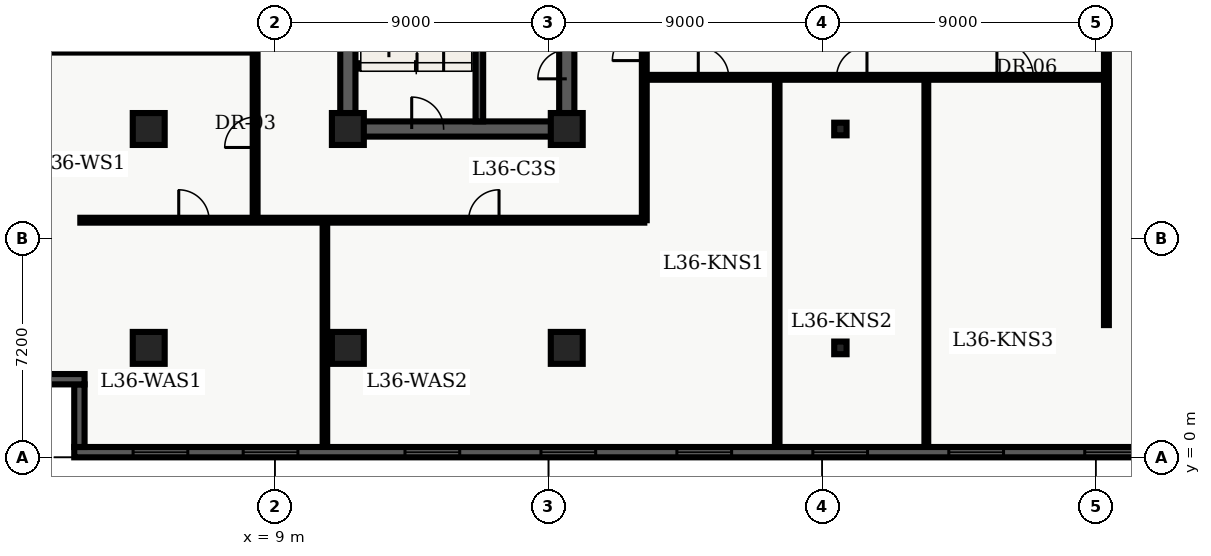
"""IFC4 building model, lengths in metres.
Left out: names, types, materials, properties, quantities, classifications, styles, units other than length and angle.
Written with IfcOpenShell. Run it as: python <this file> out.ifc"""

import sys

from ifc_helpers import new_model, entity, si_unit, converted_unit, direction, frame, origin_with_axes, origin_2d_with_axis, place, context, subcontext, project, spatial, polyline, rectangle, i_section, outline, extrude, element, fill, save


model = new_model("IFC4")
c1 = context("Model", 3, precision=1e-05, world=origin_with_axes(), true_north=direction((0.0, 1.0)))
c2 = subcontext(c1, "Body", "Model", "MODEL_VIEW")
j1 = project(units=[si_unit("LENGTHUNIT", "METRE"), converted_unit("PLANEANGLEUNIT", "DEGREE", entity("IfcPlaneAngleMeasure", 0.017), si_unit("PLANEANGLEUNIT", "RADIAN"), dimensions=[0, 0, 0, 0, 0, 0, 0])], contexts=[c1])
p1 = place(None, origin_with_axes())
s1 = spatial("IfcSite", under=j1, at=p1, CompositionType="ELEMENT")
p2 = place(p1, origin_with_axes())
s2 = spatial("IfcBuilding", under=s1, at=p2, CompositionType="ELEMENT")
p3 = place(p2, frame((0.0, 0.0, 148.5), z_axis=(0.0, 0.0, 1.0), x_axis=(1.0, 0.0, 0.0)))
s3 = spatial("IfcBuildingStorey", under=s2, at=p3, CompositionType="ELEMENT", Elevation=148.5)
p4 = place(p3, frame((11.4, 10.8, 0.0), z_axis=(0.0, 0.0, 1.0), x_axis=(0.0, 1.0, 0.0)))
e1 = element("IfcWall", 1, at=p4, inside=s3, PredefinedType="SHEAR", context=c2, shape_type="SweptSolid", body=[
    extrude(outline(polyline([(0.0, -0.25), (27.0, -0.25), (27.0, 0.25), (0.0, 0.25), (0.0, -0.25)])), origin_with_axes(), (0.0, 0.0, 1.0), 3.66),
])
p5 = place(p3, frame((11.4, 10.8, 0.0), z_axis=(0.0, 0.0, 1.0), x_axis=(1.0, 0.0, 0.0)))
e2 = element("IfcWall", 2, at=p5, inside=s3, PredefinedType="SHEAR", context=c2, shape_type="SweptSolid", body=[
    extrude(outline(polyline([(0.0, -0.25), (7.2, -0.25), (7.2, 0.25), (0.0, 0.25), (0.0, -0.25)])), origin_with_axes(), (0.0, 0.0, 1.0), 3.66),
])
p6 = place(p5, frame((2.625, 0.0, 0.0), z_axis=(0.0, 0.0, 1.0), x_axis=(1.0, 0.0, 0.0)))
e3 = element("IfcOpeningElement", 3, at=p6, cuts=e2, PredefinedType="OPENING", context=c2, shape_type="SweptSolid", body=[
    extrude(rectangle(XDim=1.05, YDim=0.52, at=origin_2d_with_axis()), origin_with_axes(), (0.0, 0.0, 1.0), 2.15),
])
p7 = place(p3, frame((18.6, 10.8, 0.0), z_axis=(0.0, 0.0, 1.0), x_axis=(0.0, 1.0, 0.0)))
e4 = element("IfcWall", 4, at=p7, inside=s3, PredefinedType="SHEAR", context=c2, shape_type="SweptSolid", body=[
    extrude(outline(polyline([(0.0, -0.25), (13.5, -0.25), (13.5, 0.25), (0.0, 0.25), (0.0, -0.25)])), origin_with_axes(), (0.0, 0.0, 1.0), 3.66),
])
p8 = place(p7, frame((11.125, 0.0, 0.0), z_axis=(0.0, 0.0, 1.0), x_axis=(1.0, 0.0, 0.0)))
e5 = element("IfcOpeningElement", 5, at=p8, cuts=e4, PredefinedType="OPENING", context=c2, shape_type="SweptSolid", body=[
    extrude(rectangle(XDim=1.05, YDim=0.52, at=origin_2d_with_axis()), origin_with_axes(), (0.0, 0.0, 1.0), 2.15),
])
p9 = place(p7, frame((2.125, 0.0, 0.0), z_axis=(0.0, 0.0, 1.0), x_axis=(1.0, 0.0, 0.0)))
e6 = element("IfcOpeningElement", 6, at=p9, cuts=e4, PredefinedType="OPENING", context=c2, shape_type="SweptSolid", body=[
    extrude(rectangle(XDim=0.95, YDim=0.52, at=origin_2d_with_axis()), origin_with_axes(), (0.0, 0.0, 1.0), 2.15),
])
p10 = place(p7, frame((6.275, 0.0, 0.0), z_axis=(0.0, 0.0, 1.0), x_axis=(1.0, 0.0, 0.0)))
e7 = element("IfcOpeningElement", 7, at=p10, cuts=e4, PredefinedType="OPENING", context=c2, shape_type="SweptSolid", body=[
    extrude(rectangle(XDim=0.95, YDim=0.52, at=origin_2d_with_axis()), origin_with_axes(), (0.0, 0.0, 1.0), 2.15),
])
p11 = place(p3, frame((15.725, 11.05, 0.0), z_axis=(0.0, 0.0, 1.0), x_axis=(0.0, 1.0, 0.0)))
e8 = element("IfcWall", 8, at=p11, inside=s3, PredefinedType="SHEAR", context=c2, shape_type="SweptSolid", body=[
    extrude(outline(polyline([(0.0, -0.125), (8.65, -0.125), (8.65, 0.125), (0.0, 0.125), (0.0, -0.125)])), origin_with_axes(), (0.0, 0.0, 1.0), 3.66),
])
for number, where, z_axis, x_axis in (
    (9, (11.4, 3.6, 0.0), (0.0, 0.0, 1.0), (1.0, 0.0, 0.0)),
    (10, (11.4, 10.8, 0.0), (0.0, 0.0, 1.0), (1.0, 0.0, 0.0)),
    (11, (18.6, 3.6, 0.0), (0.0, 0.0, 1.0), (1.0, 0.0, 0.0)),
    (12, (18.6, 10.8, 0.0), (0.0, 0.0, 1.0), (1.0, 0.0, 0.0)),
    (13, (4.85, 3.6, 0.0), (0.0, 0.0, 1.0), (1.0, 0.0, 0.0)),
    (14, (4.85, 10.8, 0.0), (0.0, 0.0, 1.0), (1.0, 0.0, 0.0)),
):
    element("IfcColumn", number, at=place(p3, frame(where, z_axis=z_axis, x_axis=x_axis)), inside=s3, PredefinedType="COLUMN", context=c2, shape_type="SweptSolid", body=[
        extrude(rectangle(XDim=1.05, YDim=1.05, at=origin_2d_with_axis()), origin_with_axes(), (0.0, 0.0, 1.0), 3.9),
    ])
for number, where, z_axis, x_axis in (
    (15, (27.6, 3.6, 0.0), (0.0, 0.0, 1.0), (1.0, 0.0, 0.0)),
    (16, (27.6, 10.8, 0.0), (0.0, 0.0, 1.0), (1.0, 0.0, 0.0)),
):
    element("IfcColumn", number, at=place(p3, frame(where, z_axis=z_axis, x_axis=x_axis)), inside=s3, PredefinedType="COLUMN", context=c2, shape_type="SweptSolid", body=[
        extrude(i_section(OverallWidth=0.406, OverallDepth=0.416, WebThickness=0.03, FlangeThickness=0.048, FilletRadius=0.022, at=origin_2d_with_axis()), origin_with_axes(), (0.0, 0.0, 1.0), 3.9),
    ])
p12 = place(p3, frame((2.6, 7.8, 0.0), z_axis=(0.0, 0.0, 1.0), x_axis=(1.0, 0.0, 0.0)))
e17 = element("IfcWall", 17, at=p12, inside=s3, PredefinedType="PARTITIONING", context=c2, shape_type="SweptSolid", body=[
    extrude(outline(polyline([(0.0, -0.08), (18.55, -0.08), (18.55, 0.08), (0.0, 0.08), (0.0, -0.08)])), origin_with_axes(), (0.0, 0.0, 1.0), 2.7),
])
p13 = place(p12, frame((3.737, 0.0, 0.0), z_axis=(0.0, 0.0, 1.0), x_axis=(1.0, 0.0, 0.0)))
e18 = element("IfcOpeningElement", 18, at=p13, cuts=e17, PredefinedType="OPENING", context=c2, shape_type="SweptSolid", body=[
    extrude(rectangle(XDim=1.0, YDim=0.18, at=origin_2d_with_axis()), origin_with_axes(), (0.0, 0.0, 1.0), 2.15),
])
p14 = place(p12, frame((13.273, 0.0, 0.0), z_axis=(0.0, 0.0, 1.0), x_axis=(1.0, 0.0, 0.0)))
e19 = element("IfcOpeningElement", 19, at=p14, cuts=e17, PredefinedType="OPENING", context=c2, shape_type="SweptSolid", body=[
    extrude(rectangle(XDim=1.0, YDim=0.18, at=origin_2d_with_axis()), origin_with_axes(), (0.0, 0.0, 1.0), 2.15),
])
p15 = place(p3, frame((21.15, 7.8, 0.0), z_axis=(0.0, 0.0, 1.0), x_axis=(0.0, 1.0, 0.0)))
e20 = element("IfcWall", 20, at=p15, inside=s3, PredefinedType="PARTITIONING", context=c2, shape_type="SweptSolid", body=[
    extrude(outline(polyline([(0.0, -0.08), (32.7, -0.08), (32.7, 0.08), (0.0, 0.08), (0.0, -0.08)])), origin_with_axes(), (0.0, 0.0, 1.0), 2.7),
])
p16 = place(p15, frame((5.775, 0.0, 0.0), z_axis=(0.0, 0.0, 1.0), x_axis=(1.0, 0.0, 0.0)))
e21 = element("IfcOpeningElement", 21, at=p16, cuts=e20, PredefinedType="OPENING", context=c2, shape_type="SweptSolid", body=[
    extrude(rectangle(XDim=1.05, YDim=0.18, at=origin_2d_with_axis()), origin_with_axes(), (0.0, 0.0, 1.0), 2.15),
])
p17 = place(p3, frame((8.35, 7.8, 0.0), z_axis=(0.0, 0.0, 1.0), x_axis=(0.0, 1.0, 0.0)))
e22 = element("IfcWall", 22, at=p17, inside=s3, PredefinedType="PARTITIONING", context=c2, shape_type="SweptSolid", body=[
    extrude(outline(polyline([(0.0, -0.08), (12.6, -0.08), (12.6, 0.08), (0.0, 0.08), (0.0, -0.08)])), origin_with_axes(), (0.0, 0.0, 1.0), 2.7),
])
p18 = place(p17, frame((2.893, 0.0, 0.0), z_axis=(0.0, 0.0, 1.0), x_axis=(1.0, 0.0, 0.0)))
e23 = element("IfcOpeningElement", 23, at=p18, cuts=e22, PredefinedType="OPENING", context=c2, shape_type="SweptSolid", body=[
    extrude(rectangle(XDim=1.0, YDim=0.18, at=origin_2d_with_axis()), origin_with_axes(), (0.0, 0.0, 1.0), 2.15),
])
p19 = place(p17, frame((9.088, 0.0, 0.0), z_axis=(0.0, 0.0, 1.0), x_axis=(1.0, 0.0, 0.0)))
e24 = element("IfcOpeningElement", 24, at=p19, cuts=e22, PredefinedType="OPENING", context=c2, shape_type="SweptSolid", body=[
    extrude(rectangle(XDim=1.0, YDim=0.18, at=origin_2d_with_axis()), origin_with_axes(), (0.0, 0.0, 1.0), 2.15),
])
p20 = place(p3, frame((0.335, 13.455, 0.0), z_axis=(0.0, 0.0, 1.0), x_axis=(1.0, 0.0, 0.0)))
e25 = element("IfcWall", 25, at=p20, inside=s3, PredefinedType="PARTITIONING", context=c2, shape_type="SweptSolid", body=[
    extrude(outline(polyline([(0.0, -0.14), (7.895, -0.14), (7.895, 0.14), (0.0, 0.14), (0.0, -0.14)])), origin_with_axes(), (0.0, 0.0, 1.0), 2.7),
])
p21 = place(p3, frame((10.645, 0.335, 0.0), z_axis=(0.0, 0.0, 1.0), x_axis=(0.0, 1.0, 0.0)))
e26 = element("IfcWall", 26, at=p21, inside=s3, PredefinedType="PARTITIONING", context=c2, shape_type="SweptSolid", body=[
    extrude(outline(polyline([(0.0, -0.075), (7.365, -0.075), (7.365, 0.075), (0.0, 0.075), (0.0, -0.075)])), origin_with_axes(), (0.0, 0.0, 1.0), 2.7),
])
p22 = place(p3, frame((21.15, 12.5, 0.0), z_axis=(0.0, 0.0, 1.0), x_axis=(1.0, 0.0, 0.0)))
e27 = element("IfcWall", 27, at=p22, inside=s3, PredefinedType="PARTITIONING", context=c2, shape_type="SweptSolid", body=[
    extrude(outline(polyline([(0.0, -0.08), (15.2, -0.08), (15.2, 0.08), (0.0, 0.08), (0.0, -0.08)])), origin_with_axes(), (0.0, 0.0, 1.0), 2.7),
])
p23 = place(p22, frame((2.276, 0.0, 0.0), z_axis=(0.0, 0.0, 1.0), x_axis=(1.0, 0.0, 0.0)))
e28 = element("IfcOpeningElement", 28, at=p23, cuts=e27, PredefinedType="OPENING", context=c2, shape_type="SweptSolid", body=[
    extrude(rectangle(XDim=1.0, YDim=0.18, at=origin_2d_with_axis()), origin_with_axes(), (0.0, 0.0, 1.0), 2.15),
])
p24 = place(p22, frame((6.824, 0.0, 0.0), z_axis=(0.0, 0.0, 1.0), x_axis=(1.0, 0.0, 0.0)))
e29 = element("IfcOpeningElement", 29, at=p24, cuts=e27, PredefinedType="OPENING", context=c2, shape_type="SweptSolid", body=[
    extrude(rectangle(XDim=1.0, YDim=0.18, at=origin_2d_with_axis()), origin_with_axes(), (0.0, 0.0, 1.0), 2.15),
])
p25 = place(p22, frame((12.198, 0.0, 0.0), z_axis=(0.0, 0.0, 1.0), x_axis=(1.0, 0.0, 0.0)))
e30 = element("IfcOpeningElement", 30, at=p25, cuts=e27, PredefinedType="OPENING", context=c2, shape_type="SweptSolid", body=[
    extrude(rectangle(XDim=1.2, YDim=0.18, at=origin_2d_with_axis()), origin_with_axes(), (0.0, 0.0, 1.0), 2.2),
])
p26 = place(p3, frame((36.35, 4.35, 0.0), z_axis=(0.0, 0.0, 1.0), x_axis=(0.0, 1.0, 0.0)))
e31 = element("IfcWall", 31, at=p26, inside=s3, PredefinedType="PARTITIONING", context=c2, shape_type="SweptSolid", body=[
    extrude(outline(polyline([(0.0, -0.08), (16.95, -0.08), (16.95, 0.08), (0.0, 0.08), (0.0, -0.08)])), origin_with_axes(), (0.0, 0.0, 1.0), 2.7),
])
p27 = place(p3, frame((25.522, 0.335, 0.0), z_axis=(0.0, 0.0, 1.0), x_axis=(0.0, 1.0, 0.0)))
e32 = element("IfcWall", 32, at=p27, inside=s3, PredefinedType="PARTITIONING", context=c2, shape_type="SweptSolid", body=[
    extrude(outline(polyline([(0.0, -0.075), (12.045, -0.075), (12.045, 0.075), (0.0, 0.075), (0.0, -0.075)])), origin_with_axes(), (0.0, 0.0, 1.0), 2.7),
])
p28 = place(p3, frame((30.427, 0.335, 0.0), z_axis=(0.0, 0.0, 1.0), x_axis=(0.0, 1.0, 0.0)))
e33 = element("IfcWall", 33, at=p28, inside=s3, PredefinedType="PARTITIONING", context=c2, shape_type="SweptSolid", body=[
    extrude(outline(polyline([(0.0, -0.062), (12.045, -0.062), (12.045, 0.062), (0.0, 0.062), (0.0, -0.062)])), origin_with_axes(), (0.0, 0.0, 1.0), 2.7),
])
p29 = place(p3, frame((57.26, 0.17, 0.0), z_axis=(0.0, 0.0, 1.0), x_axis=(-1.0, 0.0, 0.0)))
e34 = element("IfcWall", 34, at=p29, inside=s3, PredefinedType="SOLIDWALL", context=c2, shape_type="SweptSolid", body=[
    extrude(outline(polyline([(0.0, -0.17), (54.86, -0.17), (54.86, 0.17), (0.0, 0.17), (0.0, -0.17)])), origin_with_axes(), (0.0, 0.0, 1.0), 3.66),
])
p30 = place(p29, frame((2.836, 0.0, 0.45), z_axis=(0.0, 0.0, 1.0), x_axis=(1.0, 0.0, 0.0)))
e35 = element("IfcOpeningElement", 35, at=p30, cuts=e34, PredefinedType="OPENING", context=c2, shape_type="SweptSolid", body=[
    extrude(rectangle(XDim=1.8, YDim=0.36, at=origin_2d_with_axis()), origin_with_axes(), (0.0, 0.0, 1.0), 2.1),
])
p31 = place(p29, frame((7.307, 0.0, 0.45), z_axis=(0.0, 0.0, 1.0), x_axis=(1.0, 0.0, 0.0)))
e36 = element("IfcOpeningElement", 36, at=p31, cuts=e34, PredefinedType="OPENING", context=c2, shape_type="SweptSolid", body=[
    extrude(rectangle(XDim=1.8, YDim=0.36, at=origin_2d_with_axis()), origin_with_axes(), (0.0, 0.0, 1.0), 2.1),
])
p32 = place(p29, frame((11.779, 0.0, 0.45), z_axis=(0.0, 0.0, 1.0), x_axis=(1.0, 0.0, 0.0)))
e37 = element("IfcOpeningElement", 37, at=p32, cuts=e34, PredefinedType="OPENING", context=c2, shape_type="SweptSolid", body=[
    extrude(rectangle(XDim=1.8, YDim=0.36, at=origin_2d_with_axis()), origin_with_axes(), (0.0, 0.0, 1.0), 2.1),
])
p33 = place(p29, frame((16.251, 0.0, 0.45), z_axis=(0.0, 0.0, 1.0), x_axis=(1.0, 0.0, 0.0)))
e38 = element("IfcOpeningElement", 38, at=p33, cuts=e34, PredefinedType="OPENING", context=c2, shape_type="SweptSolid", body=[
    extrude(rectangle(XDim=1.8, YDim=0.36, at=origin_2d_with_axis()), origin_with_axes(), (0.0, 0.0, 1.0), 2.1),
])
p34 = place(p29, frame((20.723, 0.0, 0.45), z_axis=(0.0, 0.0, 1.0), x_axis=(1.0, 0.0, 0.0)))
e39 = element("IfcOpeningElement", 39, at=p34, cuts=e34, PredefinedType="OPENING", context=c2, shape_type="SweptSolid", body=[
    extrude(rectangle(XDim=1.8, YDim=0.36, at=origin_2d_with_axis()), origin_with_axes(), (0.0, 0.0, 1.0), 2.1),
])
p35 = place(p29, frame((25.194, 0.0, 0.45), z_axis=(0.0, 0.0, 1.0), x_axis=(1.0, 0.0, 0.0)))
e40 = element("IfcOpeningElement", 40, at=p35, cuts=e34, PredefinedType="OPENING", context=c2, shape_type="SweptSolid", body=[
    extrude(rectangle(XDim=1.8, YDim=0.36, at=origin_2d_with_axis()), origin_with_axes(), (0.0, 0.0, 1.0), 2.1),
])
p36 = place(p29, frame((29.666, 0.0, 0.45), z_axis=(0.0, 0.0, 1.0), x_axis=(1.0, 0.0, 0.0)))
e41 = element("IfcOpeningElement", 41, at=p36, cuts=e34, PredefinedType="OPENING", context=c2, shape_type="SweptSolid", body=[
    extrude(rectangle(XDim=1.8, YDim=0.36, at=origin_2d_with_axis()), origin_with_axes(), (0.0, 0.0, 1.0), 2.1),
])
p37 = place(p29, frame((34.138, 0.0, 0.45), z_axis=(0.0, 0.0, 1.0), x_axis=(1.0, 0.0, 0.0)))
e42 = element("IfcOpeningElement", 42, at=p37, cuts=e34, PredefinedType="OPENING", context=c2, shape_type="SweptSolid", body=[
    extrude(rectangle(XDim=1.8, YDim=0.36, at=origin_2d_with_axis()), origin_with_axes(), (0.0, 0.0, 1.0), 2.1),
])
p38 = place(p29, frame((38.609, 0.0, 0.45), z_axis=(0.0, 0.0, 1.0), x_axis=(1.0, 0.0, 0.0)))
e43 = element("IfcOpeningElement", 43, at=p38, cuts=e34, PredefinedType="OPENING", context=c2, shape_type="SweptSolid", body=[
    extrude(rectangle(XDim=1.8, YDim=0.36, at=origin_2d_with_axis()), origin_with_axes(), (0.0, 0.0, 1.0), 2.1),
])
p39 = place(p29, frame((43.081, 0.0, 0.45), z_axis=(0.0, 0.0, 1.0), x_axis=(1.0, 0.0, 0.0)))
e44 = element("IfcOpeningElement", 44, at=p39, cuts=e34, PredefinedType="OPENING", context=c2, shape_type="SweptSolid", body=[
    extrude(rectangle(XDim=1.8, YDim=0.36, at=origin_2d_with_axis()), origin_with_axes(), (0.0, 0.0, 1.0), 2.1),
])
p40 = place(p29, frame((48.403, 0.0, 0.45), z_axis=(0.0, 0.0, 1.0), x_axis=(1.0, 0.0, 0.0)))
e45 = element("IfcOpeningElement", 45, at=p40, cuts=e34, PredefinedType="OPENING", context=c2, shape_type="SweptSolid", body=[
    extrude(rectangle(XDim=1.8, YDim=0.36, at=origin_2d_with_axis()), origin_with_axes(), (0.0, 0.0, 1.0), 2.1),
])
p41 = place(p29, frame((52.024, 0.0, 0.45), z_axis=(0.0, 0.0, 1.0), x_axis=(1.0, 0.0, 0.0)))
e46 = element("IfcOpeningElement", 46, at=p41, cuts=e34, PredefinedType="OPENING", context=c2, shape_type="SweptSolid", body=[
    extrude(rectangle(XDim=1.8, YDim=0.36, at=origin_2d_with_axis()), origin_with_axes(), (0.0, 0.0, 1.0), 2.1),
])
p42 = place(p3, frame((2.57, 0.34, 0.0), z_axis=(0.0, 0.0, 1.0), x_axis=(0.0, 1.0, 0.0)))
e47 = element("IfcWall", 47, at=p42, inside=s3, PredefinedType="SOLIDWALL", context=c2, shape_type="SweptSolid", body=[
    extrude(outline(polyline([(0.0, -0.17), (2.06, -0.17), (2.06, 0.17), (0.0, 0.17), (0.0, -0.17)])), origin_with_axes(), (0.0, 0.0, 1.0), 3.66),
])
p43 = place(p3, frame((2.74, 2.57, 0.0), z_axis=(0.0, 0.0, 1.0), x_axis=(-1.0, 0.0, 0.0)))
e48 = element("IfcWall", 48, at=p43, inside=s3, PredefinedType="SOLIDWALL", context=c2, shape_type="SweptSolid", body=[
    extrude(outline(polyline([(0.0, -0.17), (2.74, -0.17), (2.74, 0.17), (0.0, 0.17), (0.0, -0.17)])), origin_with_axes(), (0.0, 0.0, 1.0), 3.66),
])
p44 = place(p5, frame((2.625, 0.0, 0.0), z_axis=(0.0, 0.0, 1.0), x_axis=(1.0, 0.0, 0.0)))
e49 = element("IfcDoor", 49, at=p44, inside=s3, OperationType="SINGLE_SWING_LEFT", PredefinedType="DOOR", context=c2, shape_type="SweptSolid", body=[
    extrude(rectangle(XDim=1.05, YDim=0.09, at=origin_2d_with_axis()), origin_with_axes(), (0.0, 0.0, 1.0), 2.15),
])
fill(e3, e49)
p45 = place(p7, frame((2.125, 0.0, 0.0), z_axis=(0.0, 0.0, 1.0), x_axis=(1.0, 0.0, 0.0)))
e50 = element("IfcDoor", 50, at=p45, inside=s3, OperationType="SINGLE_SWING_LEFT", PredefinedType="DOOR", context=c2, shape_type="SweptSolid", body=[
    extrude(rectangle(XDim=0.95, YDim=0.09, at=origin_2d_with_axis()), origin_with_axes(), (0.0, 0.0, 1.0), 2.15),
])
fill(e6, e50)
p46 = place(p17, frame((2.893, 0.0, 0.0), z_axis=(0.0, 0.0, 1.0), x_axis=(1.0, 0.0, 0.0)))
e51 = element("IfcDoor", 51, at=p46, inside=s3, OperationType="SINGLE_SWING_LEFT", PredefinedType="DOOR", context=c2, shape_type="SweptSolid", body=[
    extrude(rectangle(XDim=1.0, YDim=0.09, at=origin_2d_with_axis()), origin_with_axes(), (0.0, 0.0, 1.0), 2.15),
])
fill(e23, e51)
p47 = place(p12, frame((3.737, 0.0, 0.0), z_axis=(0.0, 0.0, 1.0), x_axis=(1.0, 0.0, 0.0)))
e52 = element("IfcDoor", 52, at=p47, inside=s3, OperationType="SINGLE_SWING_LEFT", PredefinedType="DOOR", context=c2, shape_type="SweptSolid", body=[
    extrude(rectangle(XDim=1.0, YDim=0.09, at=origin_2d_with_axis()), origin_with_axes(), (0.0, 0.0, 1.0), 2.15),
])
fill(e18, e52)
p48 = place(p12, frame((13.273, 0.0, 0.0), z_axis=(0.0, 0.0, 1.0), x_axis=(1.0, 0.0, 0.0)))
e53 = element("IfcDoor", 53, at=p48, inside=s3, OperationType="SINGLE_SWING_RIGHT", PredefinedType="DOOR", context=c2, shape_type="SweptSolid", body=[
    extrude(rectangle(XDim=1.0, YDim=0.09, at=origin_2d_with_axis()), origin_with_axes(), (0.0, 0.0, 1.0), 2.15),
])
fill(e19, e53)
p49 = place(p15, frame((5.775, 0.0, 0.0), z_axis=(0.0, 0.0, 1.0), x_axis=(1.0, 0.0, 0.0)))
e54 = element("IfcDoor", 54, at=p49, inside=s3, OperationType="SINGLE_SWING_LEFT", PredefinedType="DOOR", context=c2, shape_type="SweptSolid", body=[
    extrude(rectangle(XDim=1.05, YDim=0.09, at=origin_2d_with_axis()), origin_with_axes(), (0.0, 0.0, 1.0), 2.15),
])
fill(e21, e54)
p50 = place(p22, frame((2.276, 0.0, 0.0), z_axis=(0.0, 0.0, 1.0), x_axis=(1.0, 0.0, 0.0)))
e55 = element("IfcDoor", 55, at=p50, inside=s3, OperationType="SINGLE_SWING_LEFT", PredefinedType="DOOR", context=c2, shape_type="SweptSolid", body=[
    extrude(rectangle(XDim=1.0, YDim=0.09, at=origin_2d_with_axis()), origin_with_axes(), (0.0, 0.0, 1.0), 2.15),
])
fill(e28, e55)
p51 = place(p22, frame((6.824, 0.0, 0.0), z_axis=(0.0, 0.0, 1.0), x_axis=(1.0, 0.0, 0.0)))
e56 = element("IfcDoor", 56, at=p51, inside=s3, OperationType="SINGLE_SWING_RIGHT", PredefinedType="DOOR", context=c2, shape_type="SweptSolid", body=[
    extrude(rectangle(XDim=1.0, YDim=0.09, at=origin_2d_with_axis()), origin_with_axes(), (0.0, 0.0, 1.0), 2.15),
])
fill(e29, e56)
p52 = place(p22, frame((12.198, 0.0, 0.0), z_axis=(0.0, 0.0, 1.0), x_axis=(1.0, 0.0, 0.0)))
e57 = element("IfcDoor", 57, at=p52, inside=s3, OperationType="SINGLE_SWING_LEFT", PredefinedType="DOOR", context=c2, shape_type="SweptSolid", body=[
    extrude(rectangle(XDim=1.2, YDim=0.09, at=origin_2d_with_axis()), origin_with_axes(), (0.0, 0.0, 1.0), 2.2),
])
fill(e30, e57)
p53 = place(p29, frame((20.723, 0.0, 0.45), z_axis=(0.0, 0.0, 1.0), x_axis=(1.0, 0.0, 0.0)))
e58 = element("IfcWindow", 58, at=p53, inside=s3, PredefinedType="WINDOW", context=c2, shape_type="SweptSolid", body=[
    extrude(rectangle(XDim=1.8, YDim=0.09, at=origin_2d_with_axis()), origin_with_axes(), (0.0, 0.0, 1.0), 2.1),
])
fill(e39, e58)
p54 = place(p29, frame((25.194, 0.0, 0.45), z_axis=(0.0, 0.0, 1.0), x_axis=(1.0, 0.0, 0.0)))
e59 = element("IfcWindow", 59, at=p54, inside=s3, PredefinedType="WINDOW", context=c2, shape_type="SweptSolid", body=[
    extrude(rectangle(XDim=1.8, YDim=0.09, at=origin_2d_with_axis()), origin_with_axes(), (0.0, 0.0, 1.0), 2.1),
])
fill(e40, e59)
p55 = place(p29, frame((29.666, 0.0, 0.45), z_axis=(0.0, 0.0, 1.0), x_axis=(1.0, 0.0, 0.0)))
e60 = element("IfcWindow", 60, at=p55, inside=s3, PredefinedType="WINDOW", context=c2, shape_type="SweptSolid", body=[
    extrude(rectangle(XDim=1.8, YDim=0.09, at=origin_2d_with_axis()), origin_with_axes(), (0.0, 0.0, 1.0), 2.1),
])
fill(e41, e60)
p56 = place(p29, frame((34.138, 0.0, 0.45), z_axis=(0.0, 0.0, 1.0), x_axis=(1.0, 0.0, 0.0)))
e61 = element("IfcWindow", 61, at=p56, inside=s3, PredefinedType="WINDOW", context=c2, shape_type="SweptSolid", body=[
    extrude(rectangle(XDim=1.8, YDim=0.09, at=origin_2d_with_axis()), origin_with_axes(), (0.0, 0.0, 1.0), 2.1),
])
fill(e42, e61)
p57 = place(p29, frame((38.609, 0.0, 0.45), z_axis=(0.0, 0.0, 1.0), x_axis=(1.0, 0.0, 0.0)))
e62 = element("IfcWindow", 62, at=p57, inside=s3, PredefinedType="WINDOW", context=c2, shape_type="SweptSolid", body=[
    extrude(rectangle(XDim=1.8, YDim=0.09, at=origin_2d_with_axis()), origin_with_axes(), (0.0, 0.0, 1.0), 2.1),
])
fill(e43, e62)
p58 = place(p29, frame((43.081, 0.0, 0.45), z_axis=(0.0, 0.0, 1.0), x_axis=(1.0, 0.0, 0.0)))
e63 = element("IfcWindow", 63, at=p58, inside=s3, PredefinedType="WINDOW", context=c2, shape_type="SweptSolid", body=[
    extrude(rectangle(XDim=1.8, YDim=0.09, at=origin_2d_with_axis()), origin_with_axes(), (0.0, 0.0, 1.0), 2.1),
])
fill(e44, e63)
p59 = place(p29, frame((48.403, 0.0, 0.45), z_axis=(0.0, 0.0, 1.0), x_axis=(1.0, 0.0, 0.0)))
e64 = element("IfcWindow", 64, at=p59, inside=s3, PredefinedType="WINDOW", context=c2, shape_type="SweptSolid", body=[
    extrude(rectangle(XDim=1.8, YDim=0.09, at=origin_2d_with_axis()), origin_with_axes(), (0.0, 0.0, 1.0), 2.1),
])
fill(e45, e64)
p60 = place(p29, frame((52.024, 0.0, 0.45), z_axis=(0.0, 0.0, 1.0), x_axis=(1.0, 0.0, 0.0)))
e65 = element("IfcWindow", 65, at=p60, inside=s3, PredefinedType="WINDOW", context=c2, shape_type="SweptSolid", body=[
    extrude(rectangle(XDim=1.8, YDim=0.09, at=origin_2d_with_axis()), origin_with_axes(), (0.0, 0.0, 1.0), 2.1),
])
fill(e46, e65)
save(model, sys.argv[1])
